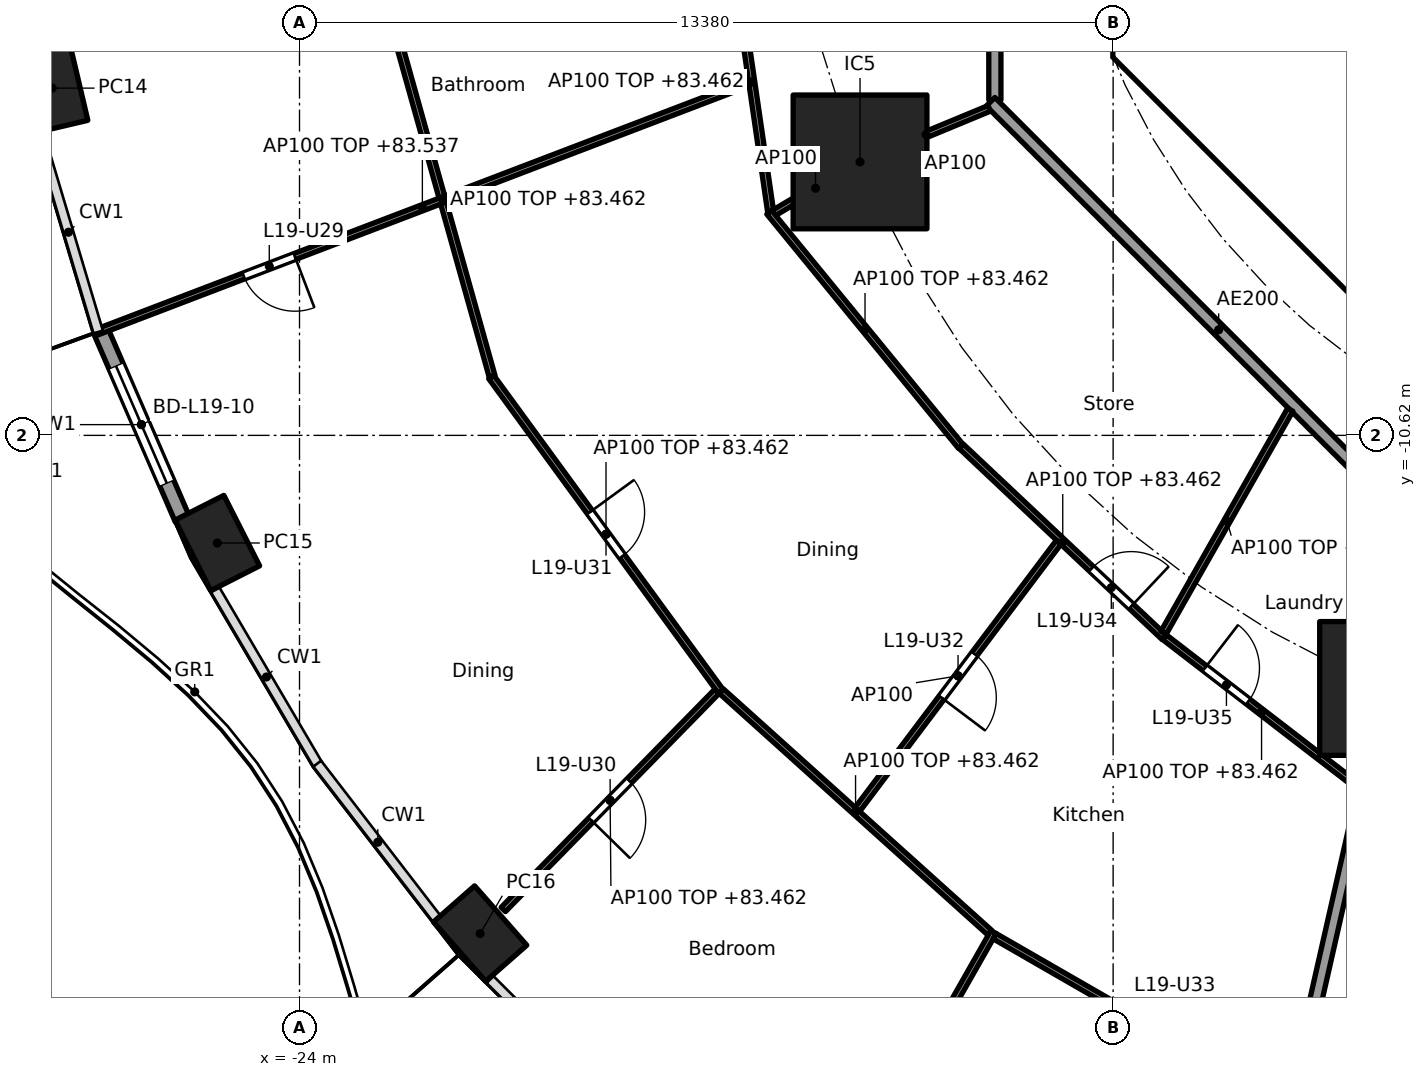
"""IFC4 building model, lengths in metres.
Left out: names, types, materials, properties, quantities, classifications, styles, units other than length and angle.
Written with IfcOpenShell. Run it as: python <this file> out.ifc"""

import sys

from ifc_helpers import new_model, si_unit, direction, frame, frame_2d, origin, origin_2d, place, context, subcontext, project, spatial, polyline, rectangle, hollow_rectangle, outline, extrude, element, fill, save


model = new_model("IFC4")
c1 = context("Model", 3, precision=1e-05, world=origin(), true_north=direction((0.0, 1.0)))
c2 = subcontext(c1, "Body", "Model", "MODEL_VIEW")
j1 = project(units=[si_unit("LENGTHUNIT", "METRE"), si_unit("PLANEANGLEUNIT", "RADIAN")], contexts=[c1])
p1 = place(None, origin())
s1 = spatial("IfcSite", under=j1, at=p1, CompositionType="ELEMENT")
p2 = place(p1, origin())
s2 = spatial("IfcBuilding", under=s1, at=p2, CompositionType="ELEMENT")
p3 = place(p2, frame((0.0, 0.0, 80.7)))
s3 = spatial("IfcBuildingStorey", under=s2, at=p3, CompositionType="ELEMENT", Elevation=80.7)
for number, where, z_axis, x_axis in (
    (1, (-28.068, -4.91, 0.0), (0.0, 0.0, 1.0), (0.229, -0.973, 0.0)),
    (2, (-25.352, -12.39, 0.0), (0.0, 0.0, 1.0), (0.452, -0.892, 0.0)),
    (3, (-21.03, -18.813, 0.0), (0.0, 0.0, 1.0), (0.66, -0.751, 0.0)),
):
    element("IfcColumn", number, at=place(p3, frame(where, z_axis=z_axis, x_axis=x_axis)), inside=s3, PredefinedType="COLUMN", context=c2, shape_type="SweptSolid", body=[
        extrude(hollow_rectangle(XDim=1.3, YDim=0.9, WallThickness=0.045, at=origin_2d()), origin(), (0.0, 0.0, 1.0), 3.7),
    ])
for number, where, z_axis, x_axis in (
    (4, (-14.782, -6.123, 0.0), (0.0, 0.0, 1.0), (1.0, 0.0, 0.0)),
    (5, (-6.123, -14.782, 0.0), (0.0, 0.0, 1.0), (1.0, 0.0, 0.0)),
):
    element("IfcColumn", number, at=place(p3, frame(where, z_axis=z_axis, x_axis=x_axis)), inside=s3, PredefinedType="COLUMN", context=c2, shape_type="SweptSolid", body=[
        extrude(rectangle(XDim=2.2, YDim=2.2, at=origin_2d()), origin(), (0.0, 0.0, 1.0), 3.7),
    ])
p4 = place(p3, frame((-25.928, -11.994, 0.0), z_axis=(0.0, 0.0, 1.0), x_axis=(-0.397682447205, 0.917523117521, 0.0)))
e6 = element("IfcWall", 6, at=p4, inside=s3, PredefinedType="SOLIDWALL", context=c2, shape_type="SweptSolid", body=[
    extrude(rectangle(XDim=3.38, YDim=0.25, at=frame_2d((1.69, 0.0))), origin(), (0.0, 0.0, 1.0), 3.44),
])
p5 = place(p4, frame((0.64, 0.0, 0.0)))
e7 = element("IfcOpeningElement", 7, at=p5, cuts=e6, PredefinedType="OPENING", context=c2, shape_type="SweptSolid", body=[
    extrude(rectangle(XDim=2.1, YDim=2.4, at=frame_2d((1.05, 1.2))), frame((0.0, 0.135, 0.0), z_axis=(0.0, -1.0, 0.0), x_axis=(1.0, 0.0, 0.0)), (0.0, 0.0, 1.0), 0.27),
])
p6 = place(p3, frame((-9.988, -4.613, 0.0), z_axis=(0.0, 0.0, 1.0), x_axis=(0.707106781187, -0.707106781187, 0.0)))
e8 = element("IfcWall", 8, at=p6, inside=s3, PredefinedType="SHEAR", context=c2, shape_type="SweptSolid", body=[
    extrude(rectangle(XDim=7.602, YDim=0.6, at=frame_2d((3.801, 0.0))), origin(), (0.0, 0.0, 1.0), 3.44),
])
p7 = place(p6, frame((6.151, 0.0, 0.0)))
e9 = element("IfcOpeningElement", 9, at=p7, cuts=e8, PredefinedType="OPENING", context=c2, shape_type="SweptSolid", body=[
    extrude(rectangle(XDim=1.1, YDim=2.1, at=frame_2d((0.55, 1.05))), frame((0.0, 0.31, 0.0), z_axis=(0.0, -1.0, 0.0), x_axis=(1.0, 0.0, 0.0)), (0.0, 0.0, 1.0), 0.62),
])
p8 = place(p3, origin())
e10 = element("IfcWall", 10, at=p8, inside=s3, PredefinedType="SHEAR", context=c2, shape_type="SweptSolid", body=[
    extrude(outline(polyline([(-10.625, -3.801), (-10.025, -3.801), (-10.025, -4.152), (-9.776, -4.401), (-10.2, -4.825), (-10.625, -4.401), (-10.625, -3.801)])), origin(), (0.0, 0.0, 1.0), 3.44),
])
p9 = place(p3, frame((-8.301, -5.8, 0.0), z_axis=(0.0, 0.0, 1.0), x_axis=(1.0, 0.0, 0.0)))
e11 = element("IfcWall", 11, at=p9, inside=s3, PredefinedType="PARTITIONING", context=c2, shape_type="SweptSolid", body=[
    extrude(rectangle(XDim=2.026, YDim=0.15, at=frame_2d((1.013, 0.0))), origin(), (0.0, 0.0, 1.0), 3.44),
])
p10 = place(p3, frame((-6.134, -14.831, 0.0), z_axis=(0.0, 0.0, 1.0), x_axis=(-0.221225405869, -0.975222702667, 0.0)))
e12 = element("IfcWall", 12, at=p10, inside=s3, PredefinedType="PARTITIONING", context=c2, shape_type="SweptSolid", body=[
    extrude(rectangle(XDim=11.761, YDim=0.2, at=frame_2d((5.88, 0.0))), origin(), (0.0, 0.0, 1.0), 2.762),
])
p11 = place(p3, frame((-12.565, 5.304, 0.0), z_axis=(0.0, 0.0, 1.0), x_axis=(0.0, -1.0, 0.0)))
e13 = element("IfcWall", 13, at=p11, inside=s3, PredefinedType="PARTITIONING", context=c2, shape_type="SweptSolid", body=[
    extrude(rectangle(XDim=10.409, YDim=0.2, at=frame_2d((5.205, 0.0))), origin(), (0.0, 0.0, 1.0), 3.44),
])
p12 = place(p11, frame((4.804, 0.0, 0.0)))
e14 = element("IfcOpeningElement", 14, at=p12, cuts=e13, PredefinedType="OPENING", context=c2, shape_type="SweptSolid", body=[
    extrude(rectangle(XDim=1.0, YDim=2.1, at=frame_2d((0.5, 1.05))), frame((0.0, 0.11, 0.0), z_axis=(0.0, -1.0, 0.0), x_axis=(1.0, 0.0, 0.0)), (0.0, 0.0, 1.0), 0.22),
])
p13 = place(p3, frame((-12.635, -5.134, 0.0), z_axis=(0.0, 0.0, 1.0), x_axis=(0.707106781187, -0.707106781187, 0.0)))
e15 = element("IfcWall", 15, at=p13, inside=s3, PredefinedType="PARTITIONING", context=c2, shape_type="SweptSolid", body=[
    extrude(rectangle(XDim=10.609, YDim=0.2, at=frame_2d((5.305, 0.0))), origin(), (0.0, 0.0, 1.0), 3.44),
])
p14 = place(p3, frame((-16.874, -2.677, 0.0), z_axis=(0.0, 0.0, 1.0), x_axis=(0.144260658133, -0.989539722555, 0.0)))
e16 = element("IfcWall", 16, at=p14, inside=s3, PredefinedType="PARTITIONING", context=c2, shape_type="SweptSolid", body=[
    extrude(rectangle(XDim=4.309, YDim=0.1, at=frame_2d((2.154, 0.0))), origin(), (0.0, 0.0, 1.0), 2.762),
])
p15 = place(p3, frame((-22.463, -3.832, 0.0), z_axis=(0.0, 0.0, 1.0), x_axis=(0.269797759333, -0.962917010473, 0.0)))
e17 = element("IfcWall", 17, at=p15, inside=s3, PredefinedType="PARTITIONING", context=c2, shape_type="SweptSolid", body=[
    extrude(rectangle(XDim=6.043, YDim=0.1, at=frame_2d((3.021, 0.0))), origin(), (0.0, 0.0, 1.0), 2.762),
])
p16 = place(p3, frame((-16.61, -4.826, 0.0), z_axis=(0.0, 0.0, 1.0), x_axis=(-0.934174502909, -0.356816476798, 0.0)))
e18 = element("IfcWall", 18, at=p16, inside=s3, PredefinedType="PARTITIONING", context=c2, shape_type="SweptSolid", body=[
    extrude(rectangle(XDim=11.496, YDim=0.1, at=frame_2d((5.748, 0.0))), origin(), (0.0, 0.0, 1.0), 2.837),
])
p17 = place(p16, frame((7.993, 0.0, 0.0)))
e19 = element("IfcOpeningElement", 19, at=p17, cuts=e18, PredefinedType="OPENING", context=c2, shape_type="SweptSolid", body=[
    extrude(rectangle(XDim=0.9, YDim=2.1, at=frame_2d((0.45, 1.05))), frame((0.0, 0.06, 0.0), z_axis=(0.0, -1.0, 0.0), x_axis=(1.0, 0.0, 0.0)), (0.0, 0.0, 1.0), 0.12),
])
p18 = place(p3, frame((-12.657, -5.243, 0.0), z_axis=(0.0, 0.0, 1.0), x_axis=(-0.923864733477, -0.382719158442, 0.0)))
e20 = element("IfcWall", 20, at=p18, inside=s3, PredefinedType="PARTITIONING", context=c2, shape_type="SweptSolid", body=[
    extrude(rectangle(XDim=2.25, YDim=0.1, at=frame_2d((1.125, 0.0))), origin(), (0.0, 0.0, 1.0), 3.44),
])
p19 = place(p3, frame((-14.825, -6.148, 0.0), z_axis=(0.0, 0.0, 1.0), x_axis=(-0.860452514841, -0.509530636669, 0.0)))
e21 = element("IfcWall", 21, at=p19, inside=s3, PredefinedType="PARTITIONING", context=c2, shape_type="SweptSolid", body=[
    extrude(rectangle(XDim=1.601, YDim=0.1, at=frame_2d((0.8, 0.0))), origin(), (0.0, 0.0, 1.0), 3.44),
])
p20 = place(p3, frame((-16.277, -6.951, 0.0), z_axis=(0.0, 0.0, 1.0), x_axis=(0.633427340372, -0.773802173988, 0.0)))
e22 = element("IfcWall", 22, at=p20, inside=s3, PredefinedType="PARTITIONING", context=c2, shape_type="SweptSolid", body=[
    extrude(rectangle(XDim=4.979, YDim=0.1, at=frame_2d((2.49, 0.0))), origin(), (0.0, 0.0, 1.0), 2.762),
])
p21 = place(p3, frame((-20.848, -9.658, 0.0), z_axis=(0.0, 0.0, 1.0), x_axis=(0.5895799361, -0.807710033953, 0.0)))
e23 = element("IfcWall", 23, at=p21, inside=s3, PredefinedType="PARTITIONING", context=c2, shape_type="SweptSolid", body=[
    extrude(rectangle(XDim=6.408, YDim=0.1, at=frame_2d((3.204, 0.0))), origin(), (0.0, 0.0, 1.0), 2.762),
])
p22 = place(p21, frame((2.754, 0.0, 0.0)))
e24 = element("IfcOpeningElement", 24, at=p22, cuts=e23, PredefinedType="OPENING", context=c2, shape_type="SweptSolid", body=[
    extrude(rectangle(XDim=0.9, YDim=2.1, at=frame_2d((0.45, 1.05))), frame((0.0, 0.06, 0.0), z_axis=(0.0, -1.0, 0.0), x_axis=(1.0, 0.0, 0.0)), (0.0, 0.0, 1.0), 0.12),
])
p23 = place(p3, frame((-13.118, -10.8, 0.0), z_axis=(0.0, 0.0, 1.0), x_axis=(0.72818280142, -0.685382964273, 0.0)))
e25 = element("IfcWall", 25, at=p23, inside=s3, PredefinedType="PARTITIONING", context=c2, shape_type="SweptSolid", body=[
    extrude(rectangle(XDim=4.586, YDim=0.1, at=frame_2d((2.293, 0.0))), origin(), (0.0, 0.0, 1.0), 2.762),
])
p24 = place(p23, frame((2.94, 0.0, 0.0)))
e26 = element("IfcOpeningElement", 26, at=p24, cuts=e25, PredefinedType="OPENING", context=c2, shape_type="SweptSolid", body=[
    extrude(rectangle(XDim=0.9, YDim=2.1, at=frame_2d((0.45, 1.05))), frame((0.0, 0.06, 0.0), z_axis=(0.0, -1.0, 0.0), x_axis=(1.0, 0.0, 0.0)), (0.0, 0.0, 1.0), 0.12),
])
p25 = place(p3, frame((-17.135, -14.829, 0.0), z_axis=(0.0, 0.0, 1.0), x_axis=(-0.699702869429, -0.714433967917, 0.0)))
e27 = element("IfcWall", 27, at=p25, inside=s3, PredefinedType="PARTITIONING", context=c2, shape_type="SweptSolid", body=[
    extrude(rectangle(XDim=5.022, YDim=0.1, at=frame_2d((2.511, 0.0))), origin(), (0.0, 0.0, 1.0), 2.762),
])
p26 = place(p25, frame((2.061, 0.0, 0.0)))
e28 = element("IfcOpeningElement", 28, at=p26, cuts=e27, PredefinedType="OPENING", context=c2, shape_type="SweptSolid", body=[
    extrude(rectangle(XDim=0.9, YDim=2.1, at=frame_2d((0.45, 1.05))), frame((0.0, 0.06, 0.0), z_axis=(0.0, -1.0, 0.0), x_axis=(1.0, 0.0, 0.0)), (0.0, 0.0, 1.0), 0.12),
])
p27 = place(p3, frame((-17.063, -14.827, 0.0), z_axis=(0.0, 0.0, 1.0), x_axis=(0.743478142868, -0.668760234373, 0.0)))
e29 = element("IfcWall", 29, at=p27, inside=s3, PredefinedType="PARTITIONING", context=c2, shape_type="SweptSolid", body=[
    extrude(rectangle(XDim=5.937, YDim=0.1, at=frame_2d((2.969, 0.0))), origin(), (0.0, 0.0, 1.0), 2.762),
])
p28 = place(p3, frame((-11.515, -12.377, 0.0), z_axis=(0.0, 0.0, 1.0), x_axis=(-0.60163860397, -0.798768420891, 0.0)))
e30 = element("IfcWall", 30, at=p28, inside=s3, PredefinedType="PARTITIONING", context=c2, shape_type="SweptSolid", body=[
    extrude(rectangle(XDim=5.502, YDim=0.1, at=frame_2d((2.751, 0.0))), origin(), (0.0, 0.0, 1.0), 3.44),
])
p29 = place(p28, frame((2.301, 0.0, 0.0)))
e31 = element("IfcOpeningElement", 31, at=p29, cuts=e30, PredefinedType="OPENING", context=c2, shape_type="SweptSolid", body=[
    extrude(rectangle(XDim=0.9, YDim=2.1, at=frame_2d((0.45, 1.05))), frame((0.0, 0.06, 0.0), z_axis=(0.0, -1.0, 0.0), x_axis=(1.0, 0.0, 0.0)), (0.0, 0.0, 1.0), 0.12),
])
p30 = place(p3, frame((-7.707, -10.198, 0.0), z_axis=(0.0, 0.0, 1.0), x_axis=(-0.493986531217, -0.869469554945, 0.0)))
e32 = element("IfcWall", 32, at=p30, inside=s3, PredefinedType="PARTITIONING", context=c2, shape_type="SweptSolid", body=[
    extrude(rectangle(XDim=4.217, YDim=0.1, at=frame_2d((2.109, 0.0))), origin(), (0.0, 0.0, 1.0), 2.687),
])
p31 = place(p3, frame((-9.775, -13.939, 0.0), z_axis=(0.0, 0.0, 1.0), x_axis=(0.792162117554, -0.610310723741, 0.0)))
e33 = element("IfcWall", 33, at=p31, inside=s3, PredefinedType="PARTITIONING", context=c2, shape_type="SweptSolid", body=[
    extrude(rectangle(XDim=4.03, YDim=0.1, at=frame_2d((2.015, 0.0))), origin(), (0.0, 0.0, 1.0), 2.762),
])
p32 = place(p31, frame((0.836, 0.0, 0.0)))
e34 = element("IfcOpeningElement", 34, at=p32, cuts=e33, PredefinedType="OPENING", context=c2, shape_type="SweptSolid", body=[
    extrude(rectangle(XDim=0.9, YDim=2.1, at=frame_2d((0.45, 1.05))), frame((0.0, 0.06, 0.0), z_axis=(0.0, -1.0, 0.0), x_axis=(1.0, 0.0, 0.0)), (0.0, 0.0, 1.0), 0.12),
])
p33 = place(p3, frame((-12.587, -18.787, 0.0), z_axis=(0.0, 0.0, 1.0), x_axis=(-0.493966211317, -0.869481099321, 0.0)))
e35 = element("IfcWall", 35, at=p33, inside=s3, PredefinedType="PARTITIONING", context=c2, shape_type="SweptSolid", body=[
    extrude(rectangle(XDim=5.146, YDim=0.1, at=frame_2d((2.573, 0.0))), origin(), (0.0, 0.0, 1.0), 2.762),
])
p34 = place(p3, frame((-12.568, -18.856, 0.0), z_axis=(0.0, 0.0, 1.0), x_axis=(0.866533437451, -0.499119025664, 0.0)))
e36 = element("IfcWall", 36, at=p34, inside=s3, PredefinedType="PARTITIONING", context=c2, shape_type="SweptSolid", body=[
    extrude(rectangle(XDim=5.535, YDim=0.1, at=frame_2d((2.768, 0.0))), origin(), (0.0, 0.0, 1.0), 2.762),
])
p35 = place(p34, frame((2.317, 0.0, 0.0)))
e37 = element("IfcOpeningElement", 37, at=p35, cuts=e36, PredefinedType="OPENING", context=c2, shape_type="SweptSolid", body=[
    extrude(rectangle(XDim=0.9, YDim=2.1, at=frame_2d((0.45, 1.05))), frame((0.0, 0.06, 0.0), z_axis=(0.0, -1.0, 0.0), x_axis=(1.0, 0.0, 0.0)), (0.0, 0.0, 1.0), 0.12),
])
p36 = place(p5, origin())
e38 = element("IfcDoor", 38, at=p36, inside=s3, OperationType="SLIDING_TO_LEFT", PredefinedType="DOOR", context=c2, shape_type="SweptSolid", body=[
    extrude(rectangle(XDim=2.1, YDim=2.4, at=frame_2d((1.05, 1.2))), frame((0.0, 0.025, 0.0), z_axis=(0.0, -1.0, 0.0), x_axis=(1.0, 0.0, 0.0)), (0.0, 0.0, 1.0), 0.05),
])
fill(e7, e38)
p37 = place(p17, origin())
e39 = element("IfcDoor", 39, at=p37, inside=s3, OperationType="SINGLE_SWING_LEFT", PredefinedType="DOOR", context=c2, shape_type="SweptSolid", body=[
    extrude(rectangle(XDim=0.9, YDim=2.1, at=frame_2d((0.45, 1.05))), frame((0.0, 0.025, 0.0), z_axis=(0.0, -1.0, 0.0), x_axis=(1.0, 0.0, 0.0)), (0.0, 0.0, 1.0), 0.05),
])
fill(e19, e39)
p38 = place(p26, origin())
e40 = element("IfcDoor", 40, at=p38, inside=s3, OperationType="SINGLE_SWING_RIGHT", PredefinedType="DOOR", context=c2, shape_type="SweptSolid", body=[
    extrude(rectangle(XDim=0.9, YDim=2.1, at=frame_2d((0.45, 1.05))), frame((0.0, 0.025, 0.0), z_axis=(0.0, -1.0, 0.0), x_axis=(1.0, 0.0, 0.0)), (0.0, 0.0, 1.0), 0.05),
])
fill(e28, e40)
p39 = place(p22, origin())
e41 = element("IfcDoor", 41, at=p39, inside=s3, OperationType="SINGLE_SWING_LEFT", PredefinedType="DOOR", context=c2, shape_type="SweptSolid", body=[
    extrude(rectangle(XDim=0.9, YDim=2.1, at=frame_2d((0.45, 1.05))), frame((0.0, 0.025, 0.0), z_axis=(0.0, -1.0, 0.0), x_axis=(1.0, 0.0, 0.0)), (0.0, 0.0, 1.0), 0.05),
])
fill(e24, e41)
p40 = place(p29, origin())
e42 = element("IfcDoor", 42, at=p40, inside=s3, OperationType="SINGLE_SWING_RIGHT", PredefinedType="DOOR", context=c2, shape_type="SweptSolid", body=[
    extrude(rectangle(XDim=0.9, YDim=2.1, at=frame_2d((0.45, 1.05))), frame((0.0, 0.025, 0.0), z_axis=(0.0, -1.0, 0.0), x_axis=(1.0, 0.0, 0.0)), (0.0, 0.0, 1.0), 0.05),
])
fill(e31, e42)
p41 = place(p24, origin())
e43 = element("IfcDoor", 43, at=p41, inside=s3, OperationType="SINGLE_SWING_RIGHT", PredefinedType="DOOR", context=c2, shape_type="SweptSolid", body=[
    extrude(rectangle(XDim=0.9, YDim=2.1, at=frame_2d((0.45, 1.05))), frame((0.0, 0.025, 0.0), z_axis=(0.0, -1.0, 0.0), x_axis=(1.0, 0.0, 0.0)), (0.0, 0.0, 1.0), 0.05),
])
fill(e26, e43)
p42 = place(p32, origin())
e44 = element("IfcDoor", 44, at=p42, inside=s3, OperationType="SINGLE_SWING_LEFT", PredefinedType="DOOR", context=c2, shape_type="SweptSolid", body=[
    extrude(rectangle(XDim=0.9, YDim=2.1, at=frame_2d((0.45, 1.05))), frame((0.0, 0.025, 0.0), z_axis=(0.0, -1.0, 0.0), x_axis=(1.0, 0.0, 0.0)), (0.0, 0.0, 1.0), 0.05),
])
fill(e34, e44)
save(model, sys.argv[1])
